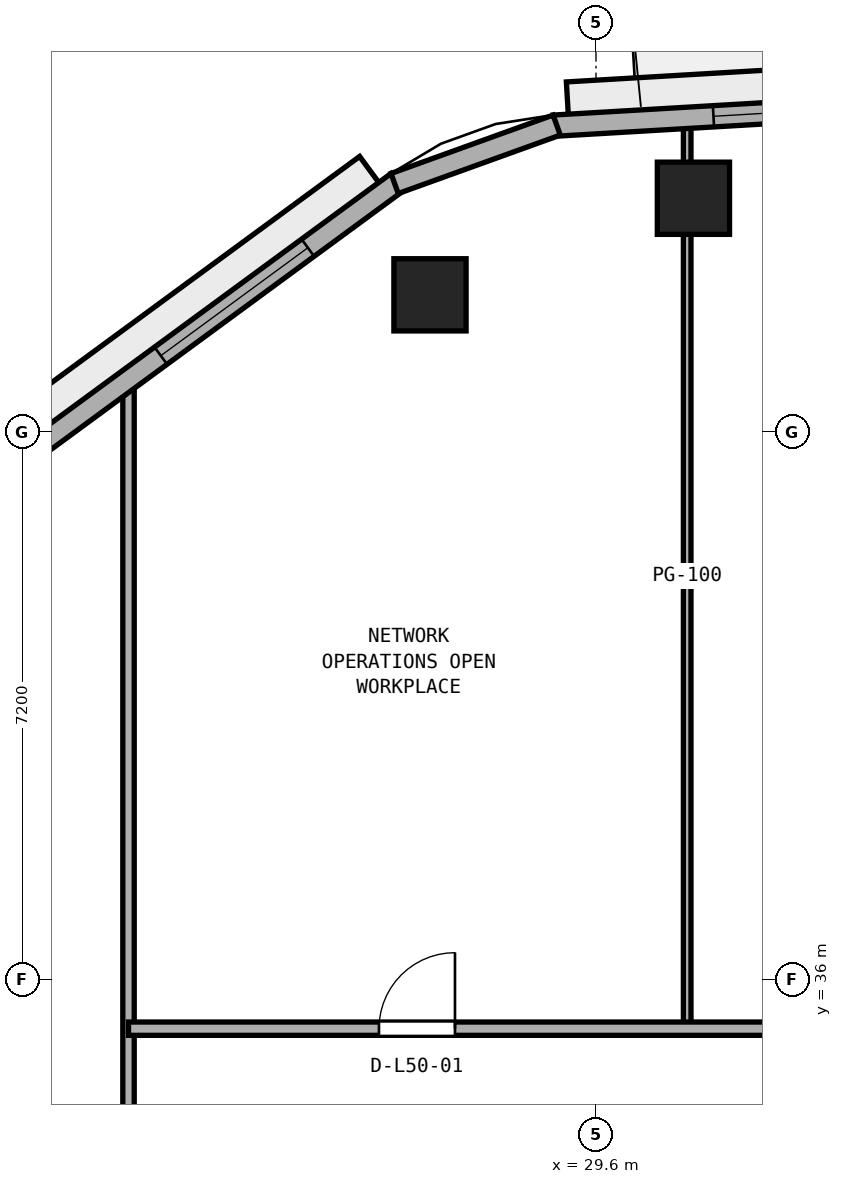
"""IFC4 building model, lengths in metres.
Left out: names, types, materials, properties, quantities, classifications, styles, units other than length and angle.
Written with IfcOpenShell. Run it as: python <this file> out.ifc"""

import sys

from ifc_helpers import new_model, si_unit, direction, frame, frame_2d, origin, origin_2d, place, context, subcontext, project, spatial, rectangle, extrude, element, fill, save


model = new_model("IFC4")
c1 = context("Model", 3, precision=1e-05, world=origin(), true_north=direction((0.0, 1.0)))
c2 = subcontext(c1, "Body", "Model", "MODEL_VIEW")
j1 = project(units=[si_unit("LENGTHUNIT", "METRE"), si_unit("PLANEANGLEUNIT", "RADIAN")], contexts=[c1])
p1 = place(None, origin())
s1 = spatial("IfcSite", under=j1, at=p1, CompositionType="ELEMENT")
p2 = place(p1, origin())
s2 = spatial("IfcBuilding", under=s1, at=p2, CompositionType="ELEMENT")
p3 = place(p2, frame((0.0, 0.0, 197.2)))
s3 = spatial("IfcBuildingStorey", under=s2, at=p3, CompositionType="ELEMENT", Elevation=197.2)
for number, where, z_axis, x_axis in (
    (1, (30.882, 46.275, 0.0), (0.0, 0.0, 1.0), (1.0, 0.0, 0.0)),
    (2, (27.416, 45.004, 0.0), (0.0, 0.0, 1.0), (1.0, 0.0, 0.0)),
):
    element("IfcColumn", number, at=place(p3, frame(where, z_axis=z_axis, x_axis=x_axis)), inside=s3, PredefinedType="COLUMN", context=c2, shape_type="SweptSolid", body=[
        extrude(rectangle(XDim=0.95, YDim=0.95, at=origin_2d()), origin(), (0.0, 0.0, 1.0), 3.8),
    ])
p4 = place(p3, frame((30.8, 35.35, 0.0), z_axis=(0.0, 0.0, 1.0), x_axis=(0.0, 1.0, 0.0)))
e3 = element("IfcWall", 3, at=p4, inside=s3, PredefinedType="PARTITIONING", context=c2, shape_type="SweptSolid", body=[
    extrude(rectangle(XDim=11.918, YDim=0.1, at=frame_2d((5.959, 0.0))), origin(), (0.0, 0.0, 1.0), 2.79),
])
p5 = place(p3, frame((23.45, 26.55, 0.0), z_axis=(0.0, 0.0, 1.0), x_axis=(0.0, 1.0, 0.0)))
e4 = element("IfcWall", 4, at=p5, inside=s3, PredefinedType="PARTITIONING", context=c2, shape_type="SweptSolid", body=[
    extrude(rectangle(XDim=17.375, YDim=0.15, at=frame_2d((8.688, 0.0))), origin(), (0.0, 0.0, 1.0), 3.54),
])
p6 = place(p5, frame((4.575, 0.0, 0.0)))
e5 = element("IfcOpeningElement", 5, at=p6, cuts=e4, PredefinedType="OPENING", context=c2, shape_type="SweptSolid", body=[
    extrude(rectangle(XDim=0.9, YDim=2.1, at=frame_2d((0.45, 1.05))), frame((0.0, 0.085, 0.0), z_axis=(0.0, -1.0, 0.0), x_axis=(1.0, 0.0, 0.0)), (0.0, 0.0, 1.0), 0.17),
])
p7 = place(p3, frame((23.45, 35.35, 0.0), z_axis=(0.0, 0.0, 1.0), x_axis=(1.0, 0.0, 0.0)))
e6 = element("IfcWall", 6, at=p7, inside=s3, PredefinedType="PARTITIONING", context=c2, shape_type="SweptSolid", body=[
    extrude(rectangle(XDim=10.95, YDim=0.175, at=frame_2d((5.475, 0.0))), origin(), (0.0, 0.0, 1.0), 3.54),
])
p8 = place(p7, frame((3.295, 0.0, 0.0)))
e7 = element("IfcOpeningElement", 7, at=p8, cuts=e6, PredefinedType="OPENING", context=c2, shape_type="SweptSolid", body=[
    extrude(rectangle(XDim=1.0, YDim=2.12, at=frame_2d((0.5, 1.06))), frame((0.0, 0.097, 0.0), z_axis=(0.0, -1.0, 0.0), x_axis=(1.0, 0.0, 0.0)), (0.0, 0.0, 1.0), 0.195),
])
p9 = place(p7, frame((8.53, 0.0, 0.0)))
e8 = element("IfcOpeningElement", 8, at=p9, cuts=e6, PredefinedType="OPENING", context=c2, shape_type="SweptSolid", body=[
    extrude(rectangle(XDim=1.0, YDim=2.12, at=frame_2d((0.5, 1.06))), frame((0.0, 0.097, 0.0), z_axis=(0.0, -1.0, 0.0), x_axis=(1.0, 0.0, 0.0)), (0.0, 0.0, 1.0), 0.195),
])
p10 = place(p3, frame((46.846, 48.277, 0.0), z_axis=(0.0, 0.0, 1.0), x_axis=(-0.998273806631, -0.05873165241, 0.0)))
e9 = element("IfcWall", 9, at=p10, inside=s3, PredefinedType="STANDARD", context=c2, shape_type="SweptSolid", body=[
    extrude(rectangle(XDim=17.833, YDim=0.28, at=frame_2d((8.917, 0.0))), origin(), (0.0, 0.0, 1.0), 3.54),
])
p11 = place(p10, frame((8.366, 0.0, 0.0)))
e10 = element("IfcOpeningElement", 10, at=p11, cuts=e9, PredefinedType="OPENING", context=c2, shape_type="SweptSolid", body=[
    extrude(rectangle(XDim=1.1, YDim=2.2, at=frame_2d((0.55, 1.1))), frame((0.0, 0.15, 0.0), z_axis=(0.0, -1.0, 0.0), x_axis=(1.0, 0.0, 0.0)), (0.0, 0.0, 1.0), 0.3),
])
p12 = place(p10, frame((2.105, 0.0, 0.9)))
e11 = element("IfcOpeningElement", 11, at=p12, cuts=e9, PredefinedType="OPENING", context=c2, shape_type="SweptSolid", body=[
    extrude(rectangle(XDim=2.4, YDim=1.75, at=frame_2d((1.2, 0.875))), frame((0.0, 0.15, 0.0), z_axis=(0.0, -1.0, 0.0), x_axis=(1.0, 0.0, 0.0)), (0.0, 0.0, 1.0), 0.3),
])
p13 = place(p10, frame((13.328, 0.0, 0.9)))
e12 = element("IfcOpeningElement", 12, at=p13, cuts=e9, PredefinedType="OPENING", context=c2, shape_type="SweptSolid", body=[
    extrude(rectangle(XDim=2.4, YDim=1.75, at=frame_2d((1.2, 0.875))), frame((0.0, 0.15, 0.0), z_axis=(0.0, -1.0, 0.0), x_axis=(1.0, 0.0, 0.0)), (0.0, 0.0, 1.0), 0.3),
])
p14 = place(p3, frame((26.986, 46.488, 0.0), z_axis=(0.0, 0.0, 1.0), x_axis=(-0.806097783211, -0.59178236194, 0.0)))
e13 = element("IfcWall", 13, at=p14, inside=s3, PredefinedType="STANDARD", context=c2, shape_type="SweptSolid", body=[
    extrude(rectangle(XDim=16.959, YDim=0.28, at=frame_2d((8.479, 0.0))), origin(), (0.0, 0.0, 1.0), 3.54),
])
p15 = place(p14, frame((1.46, 0.0, 0.9)))
e14 = element("IfcOpeningElement", 14, at=p15, cuts=e13, PredefinedType="OPENING", context=c2, shape_type="SweptSolid", body=[
    extrude(rectangle(XDim=2.4, YDim=1.75, at=frame_2d((1.2, 0.875))), frame((0.0, 0.15, 0.0), z_axis=(0.0, -1.0, 0.0), x_axis=(1.0, 0.0, 0.0)), (0.0, 0.0, 1.0), 0.3),
])
p16 = place(p14, frame((7.279, 0.0, 0.9)))
e15 = element("IfcOpeningElement", 15, at=p16, cuts=e13, PredefinedType="OPENING", context=c2, shape_type="SweptSolid", body=[
    extrude(rectangle(XDim=2.4, YDim=1.75, at=frame_2d((1.2, 0.875))), frame((0.0, 0.15, 0.0), z_axis=(0.0, -1.0, 0.0), x_axis=(1.0, 0.0, 0.0)), (0.0, 0.0, 1.0), 0.3),
])
p17 = place(p14, frame((12.599, 0.0, 0.9)))
e16 = element("IfcOpeningElement", 16, at=p17, cuts=e13, PredefinedType="OPENING", context=c2, shape_type="SweptSolid", body=[
    extrude(rectangle(XDim=2.4, YDim=1.75, at=frame_2d((1.2, 0.875))), frame((0.0, 0.15, 0.0), z_axis=(0.0, -1.0, 0.0), x_axis=(1.0, 0.0, 0.0)), (0.0, 0.0, 1.0), 0.3),
])
p18 = place(p3, frame((29.083, 47.238, 0.0), z_axis=(0.0, 0.0, 1.0), x_axis=(-0.940723909279, -0.33917329864, 0.0)))
e17 = element("IfcWall", 17, at=p18, inside=s3, PredefinedType="STANDARD", context=c2, shape_type="SweptSolid", body=[
    extrude(rectangle(XDim=2.267, YDim=0.28, at=frame_2d((1.133, 0.0))), origin(), (0.0, 0.0, 1.0), 3.54),
])
p19 = place(p8, origin())
e18 = element("IfcDoor", 18, at=p19, inside=s3, OperationType="SINGLE_SWING_RIGHT", PredefinedType="DOOR", context=c2, shape_type="SweptSolid", body=[
    extrude(rectangle(XDim=1.0, YDim=2.12, at=frame_2d((0.5, 1.06))), frame((0.0, 0.025, 0.0), z_axis=(0.0, -1.0, 0.0), x_axis=(1.0, 0.0, 0.0)), (0.0, 0.0, 1.0), 0.05),
])
fill(e7, e18)
p20 = place(p13, origin())
e19 = element("IfcWindow", 19, at=p20, inside=s3, PartitioningType="SINGLE_PANEL", PredefinedType="WINDOW", context=c2, shape_type="SweptSolid", body=[
    extrude(rectangle(XDim=2.4, YDim=1.75, at=frame_2d((1.2, 0.875))), frame((0.0, 0.03, 0.0), z_axis=(0.0, -1.0, 0.0), x_axis=(1.0, 0.0, 0.0)), (0.0, 0.0, 1.0), 0.06),
])
fill(e12, e19)
p21 = place(p15, origin())
e20 = element("IfcWindow", 20, at=p21, inside=s3, PartitioningType="SINGLE_PANEL", PredefinedType="WINDOW", context=c2, shape_type="SweptSolid", body=[
    extrude(rectangle(XDim=2.4, YDim=1.75, at=frame_2d((1.2, 0.875))), frame((0.0, 0.03, 0.0), z_axis=(0.0, -1.0, 0.0), x_axis=(1.0, 0.0, 0.0)), (0.0, 0.0, 1.0), 0.06),
])
fill(e14, e20)
save(model, sys.argv[1])
